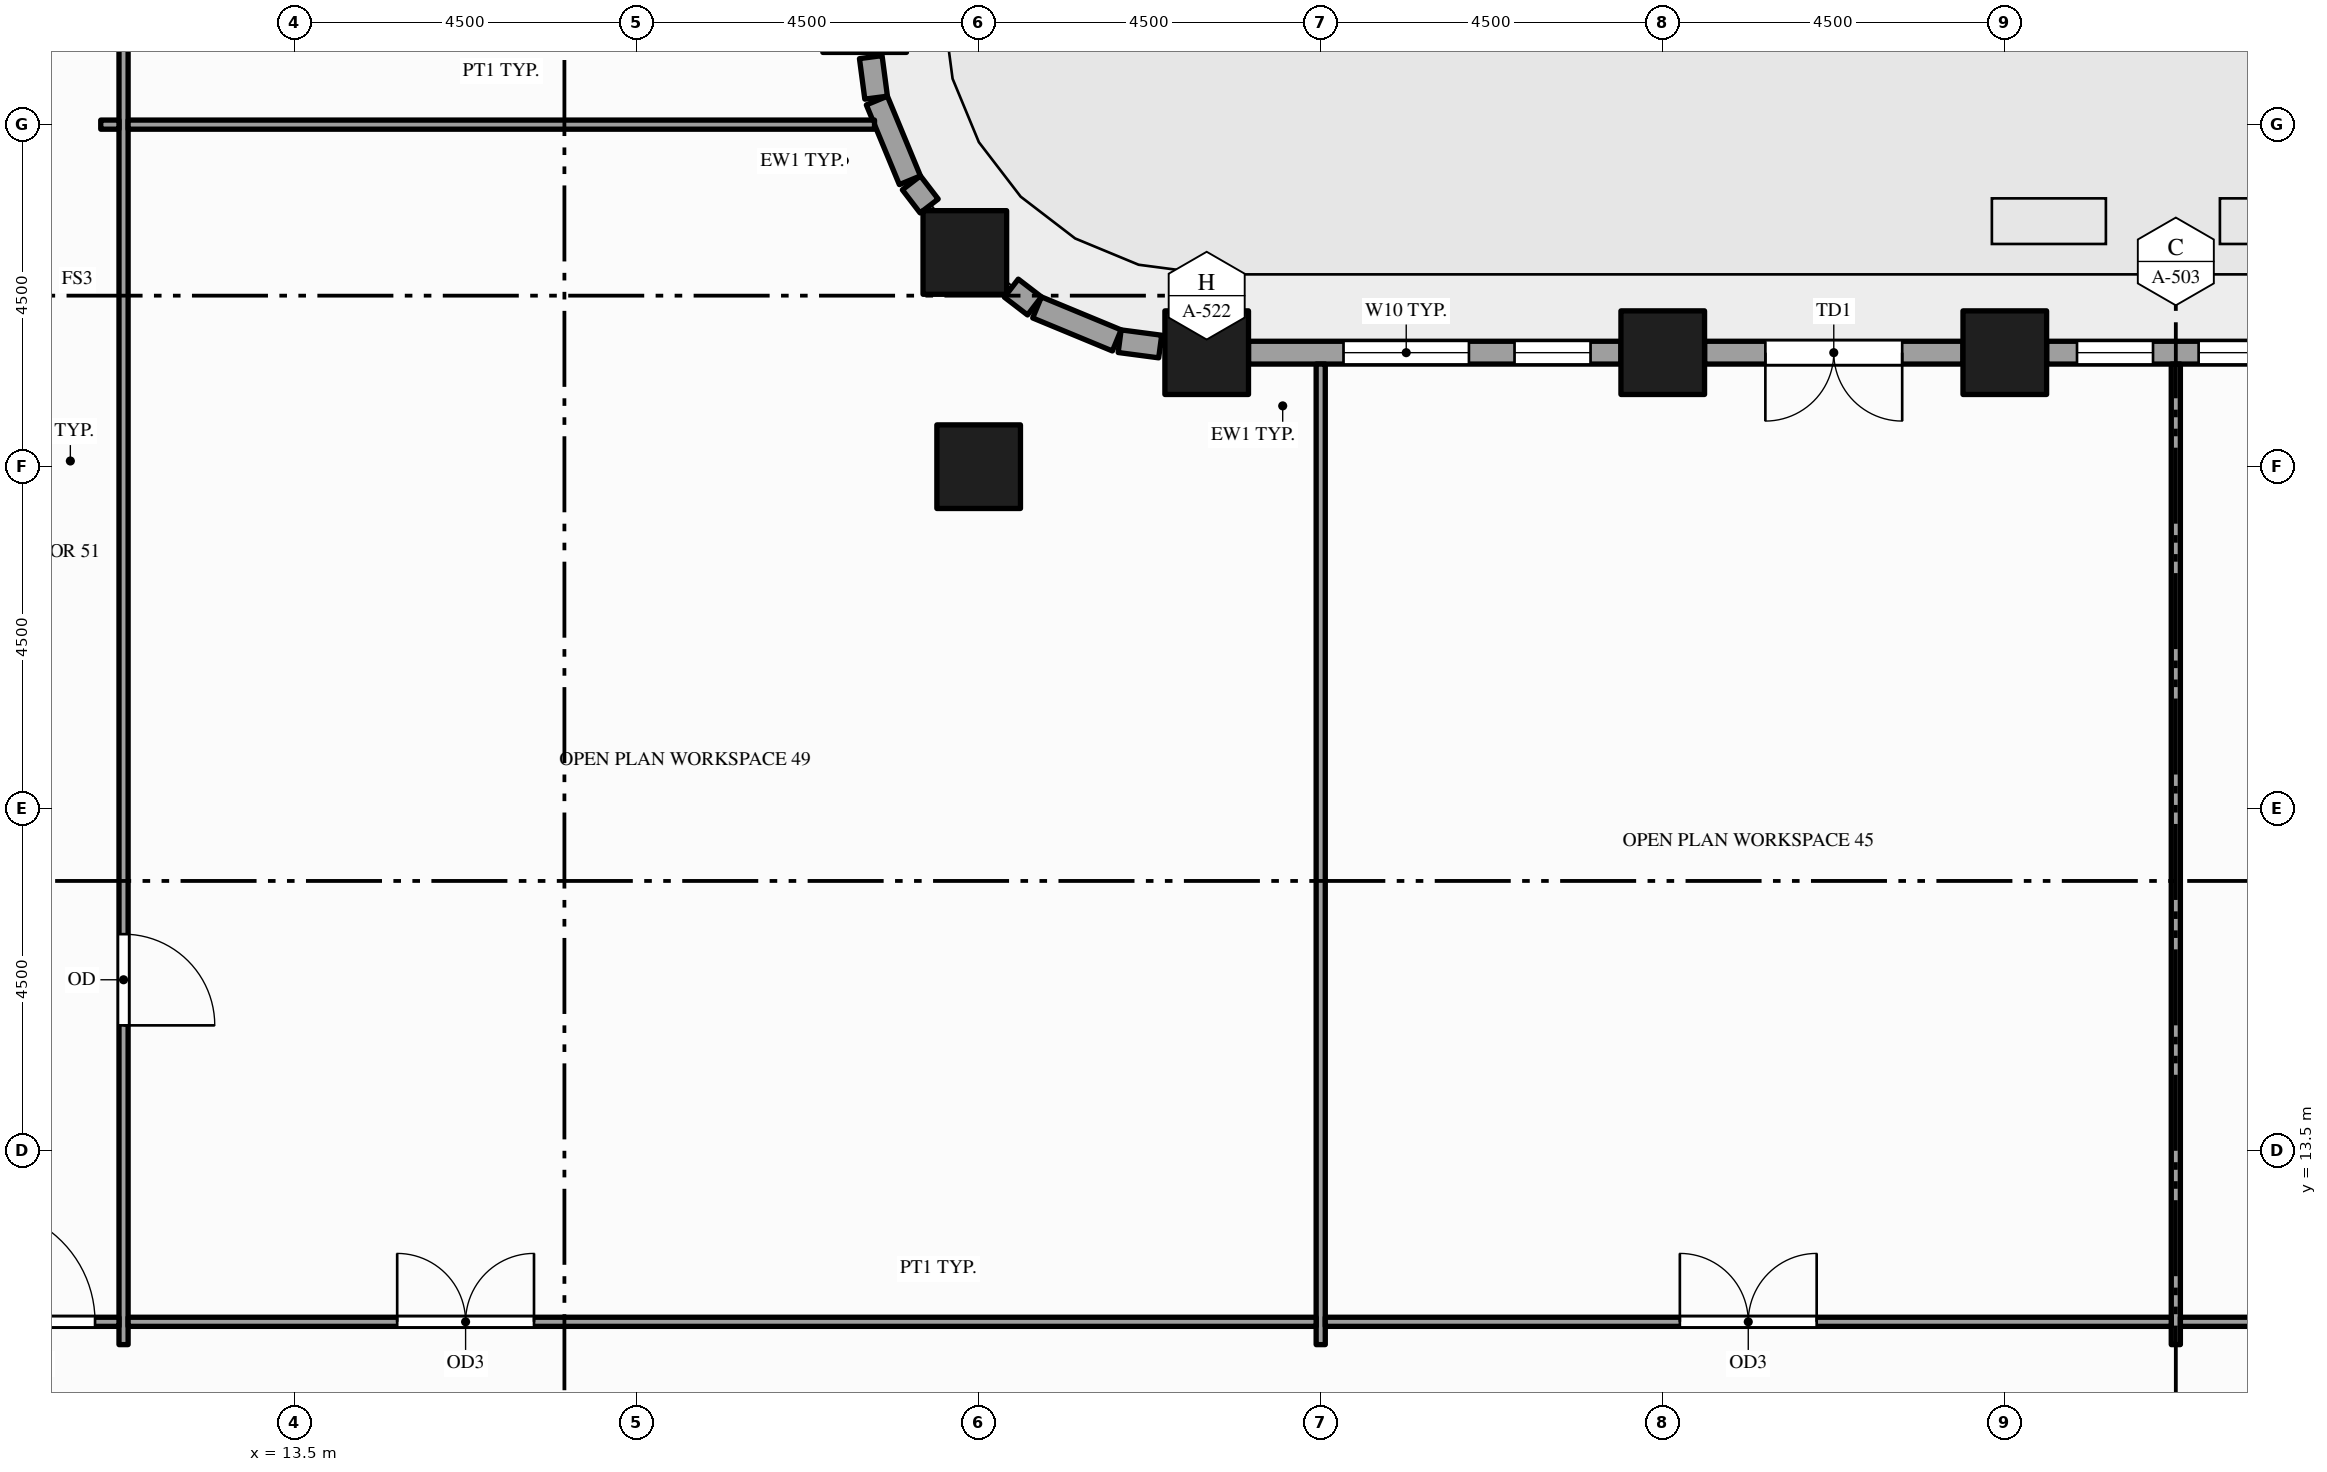
"""IFC4 building model, lengths in metres.
Left out: names, types, materials, properties, quantities, classifications, styles, units other than length and angle.
Written with IfcOpenShell. Run it as: python <this file> out.ifc"""

import sys

from ifc_helpers import new_model, si_unit, direction, frame, frame_2d, origin, origin_2d, place, context, subcontext, project, spatial, rectangle, hollow_rectangle, extrude, element, fill, save


model = new_model("IFC4")
c1 = context("Model", 3, precision=1e-05, world=origin(), true_north=direction((0.0, 1.0)))
c2 = subcontext(c1, "Body", "Model", "MODEL_VIEW")
j1 = project(units=[si_unit("LENGTHUNIT", "METRE"), si_unit("PLANEANGLEUNIT", "RADIAN")], contexts=[c1])
p1 = place(None, origin())
s1 = spatial("IfcSite", under=j1, at=p1, CompositionType="ELEMENT")
p2 = place(p1, origin())
s2 = spatial("IfcBuilding", under=s1, at=p2, CompositionType="ELEMENT")
p3 = place(p2, frame((0.0, 0.0, 29.0)))
s3 = spatial("IfcBuildingStorey", under=s2, at=p3, CompositionType="ELEMENT", Elevation=29.0)
p4 = place(p3, frame((22.318, 25.318, -0.3), z_axis=(0.0, 0.0, 1.0), x_axis=(1.0, 0.0, 0.0)))
e1 = element("IfcColumn", 1, at=p4, inside=s3, PredefinedType="COLUMN", context=c2, shape_type="SweptSolid", body=[
    extrude(hollow_rectangle(XDim=1.1, YDim=1.1, WallThickness=0.06, at=origin_2d()), origin(), (0.0, 0.0, 1.0), 4.15),
])
p5 = place(p3, frame((22.5, 22.5, -0.15), z_axis=(0.0, 0.0, 1.0), x_axis=(1.0, 0.0, 0.0)))
e2 = element("IfcColumn", 2, at=p5, inside=s3, PredefinedType="COLUMN", context=c2, shape_type="SweptSolid", body=[
    extrude(hollow_rectangle(XDim=1.1, YDim=1.1, WallThickness=0.06, at=origin_2d()), origin(), (0.0, 0.0, 1.0), 4.0),
])
for number, where, z_axis, x_axis in (
    (3, (25.5, 24.0, -0.3), (0.0, 0.0, 1.0), (1.0, 0.0, 0.0)),
    (4, (31.5, 24.0, -0.3), (0.0, 0.0, 1.0), (1.0, 0.0, 0.0)),
    (5, (36.0, 24.0, -0.3), (0.0, 0.0, 1.0), (1.0, 0.0, 0.0)),
):
    element("IfcColumn", number, at=place(p3, frame(where, z_axis=z_axis, x_axis=x_axis)), inside=s3, PredefinedType="COLUMN", context=c2, shape_type="SweptSolid", body=[
        extrude(hollow_rectangle(XDim=1.1, YDim=1.1, WallThickness=0.06, at=origin_2d()), origin(), (0.0, 0.0, 1.0), 4.15),
    ])
p6 = place(p3, frame((39.95, 24.0, 0.0), z_axis=(0.0, 0.0, 1.0), x_axis=(-1.0, 0.0, 0.0)))
e6 = element("IfcWall", 6, at=p6, inside=s3, PredefinedType="STANDARD", context=c2, shape_type="SweptSolid", body=[
    extrude(rectangle(XDim=3.4, YDim=0.3, at=frame_2d((1.7, 0.0))), origin(), (0.0, 0.0, 1.0), 3.144),
])
p7 = place(p6, frame((0.4, 0.0, 0.9)))
e7 = element("IfcOpeningElement", 7, at=p7, cuts=e6, PredefinedType="OPENING", context=c2, shape_type="SweptSolid", body=[
    extrude(rectangle(XDim=1.0, YDim=2.0, at=frame_2d((0.5, 1.0))), frame((0.0, 0.16, 0.0), z_axis=(0.0, -1.0, 0.0), x_axis=(1.0, 0.0, 0.0)), (0.0, 0.0, 1.0), 0.32),
])
p8 = place(p6, frame((2.0, 0.0, 0.9)))
e8 = element("IfcOpeningElement", 8, at=p8, cuts=e6, PredefinedType="OPENING", context=c2, shape_type="SweptSolid", body=[
    extrude(rectangle(XDim=1.0, YDim=2.0, at=frame_2d((0.5, 1.0))), frame((0.0, 0.16, 0.0), z_axis=(0.0, -1.0, 0.0), x_axis=(1.0, 0.0, 0.0)), (0.0, 0.0, 1.0), 0.32),
])
p9 = place(p3, frame((35.45, 24.0, 0.0), z_axis=(0.0, 0.0, 1.0), x_axis=(-1.0, 0.0, 0.0)))
e9 = element("IfcWall", 9, at=p9, inside=s3, PredefinedType="STANDARD", context=c2, shape_type="SweptSolid", body=[
    extrude(rectangle(XDim=3.4, YDim=0.3, at=frame_2d((1.7, 0.0))), origin(), (0.0, 0.0, 1.0), 3.144),
])
p10 = place(p9, frame((0.8, 0.0, 0.0)))
e10 = element("IfcOpeningElement", 10, at=p10, cuts=e9, PredefinedType="OPENING", context=c2, shape_type="SweptSolid", body=[
    extrude(rectangle(XDim=1.8, YDim=2.4, at=frame_2d((0.9, 1.2))), frame((0.0, 0.16, 0.0), z_axis=(0.0, -1.0, 0.0), x_axis=(1.0, 0.0, 0.0)), (0.0, 0.0, 1.0), 0.32),
])
p11 = place(p3, frame((30.95, 24.0, 0.0), z_axis=(0.0, 0.0, 1.0), x_axis=(-1.0, 0.0, 0.0)))
e11 = element("IfcWall", 11, at=p11, inside=s3, PredefinedType="STANDARD", context=c2, shape_type="SweptSolid", body=[
    extrude(rectangle(XDim=4.9, YDim=0.3, at=frame_2d((2.45, 0.0))), origin(), (0.0, 0.0, 1.0), 3.144),
])
p12 = place(p11, frame((0.4, 0.0, 0.9)))
e12 = element("IfcOpeningElement", 12, at=p12, cuts=e11, PredefinedType="OPENING", context=c2, shape_type="SweptSolid", body=[
    extrude(rectangle(XDim=1.0, YDim=2.0, at=frame_2d((0.5, 1.0))), frame((0.0, 0.16, 0.0), z_axis=(0.0, -1.0, 0.0), x_axis=(1.0, 0.0, 0.0)), (0.0, 0.0, 1.0), 0.32),
])
p13 = place(p11, frame((2.0, 0.0, 0.9)))
e13 = element("IfcOpeningElement", 13, at=p13, cuts=e11, PredefinedType="OPENING", context=c2, shape_type="SweptSolid", body=[
    extrude(rectangle(XDim=1.65, YDim=2.0, at=frame_2d((0.825, 1.0))), frame((0.0, 0.16, 0.0), z_axis=(0.0, -1.0, 0.0), x_axis=(1.0, 0.0, 0.0)), (0.0, 0.0, 1.0), 0.32),
])
p14 = place(p3, frame((24.888, 24.081, 0.0), z_axis=(0.0, 0.0, 1.0), x_axis=(-0.991417173479, 0.130736330569, 0.0)))
e14 = element("IfcWall", 14, at=p14, inside=s3, PredefinedType="STANDARD", context=c2, shape_type="SweptSolid", body=[
    extrude(rectangle(XDim=0.538, YDim=0.3, at=frame_2d((0.269, 0.0))), origin(), (0.0, 0.0, 1.0), 2.938),
])
p15 = place(p3, frame((24.317, 24.161, 0.0), z_axis=(0.0, 0.0, 1.0), x_axis=(-0.923914616768, 0.382598720491, 0.0)))
e15 = element("IfcWall", 15, at=p15, inside=s3, PredefinedType="STANDARD", context=c2, shape_type="SweptSolid", body=[
    extrude(rectangle(XDim=1.135, YDim=0.3, at=frame_2d((0.568, 0.0))), origin(), (0.0, 0.0, 1.0), 3.144),
])
for number, where, z_axis, x_axis in (
    (16, (23.234, 24.615, 0.0), (0.0, 0.0, 1.0), (-0.794, 0.609, 0.0)),
    (17, (21.849, 25.93, 0.0), (0.0, 0.0, 1.0), (-0.609, 0.794, 0.0)),
):
    element("IfcWall", number, at=place(p3, frame(where, z_axis=z_axis, x_axis=x_axis)), inside=s3, PredefinedType="STANDARD", context=c2, shape_type="SweptSolid", body=[
        extrude(rectangle(XDim=0.384, YDim=0.3, at=frame_2d((0.192, 0.0))), origin(), (0.0, 0.0, 1.0), 3.144),
    ])
p16 = place(p3, frame((21.595, 26.268, 0.0), z_axis=(0.0, 0.0, 1.0), x_axis=(-0.382598720491, 0.923914616768, 0.0)))
e18 = element("IfcWall", 18, at=p16, inside=s3, PredefinedType="STANDARD", context=c2, shape_type="SweptSolid", body=[
    extrude(rectangle(XDim=1.135, YDim=0.3, at=frame_2d((0.568, 0.0))), origin(), (0.0, 0.0, 1.0), 3.144),
])
p17 = place(p3, frame((21.151, 27.355, 0.0), z_axis=(0.0, 0.0, 1.0), x_axis=(-0.130736330569, 0.991417173479, 0.0)))
e19 = element("IfcWall", 19, at=p17, inside=s3, PredefinedType="STANDARD", context=c2, shape_type="SweptSolid", body=[
    extrude(rectangle(XDim=0.538, YDim=0.3, at=frame_2d((0.269, 0.0))), origin(), (0.0, 0.0, 1.0), 3.144),
])
p18 = place(p3, frame((11.25, 10.95, 0.0), z_axis=(0.0, 0.0, 1.0), x_axis=(0.0, 1.0, 0.0)))
e20 = element("IfcWall", 20, at=p18, inside=s3, PredefinedType="PARTITIONING", context=c2, shape_type="SweptSolid", body=[
    extrude(rectangle(XDim=20.85, YDim=0.12, at=frame_2d((10.425, 0.0))), origin(), (0.0, 0.0, 1.0), 2.6),
])
p19 = place(p18, frame((17.85, 0.0, 0.0)))
e21 = element("IfcOpeningElement", 21, at=p19, cuts=e20, PredefinedType="OPENING", context=c2, shape_type="SweptSolid", body=[
    extrude(rectangle(XDim=0.9, YDim=2.1, at=frame_2d((0.45, 1.05))), frame((0.0, 0.07, 0.0), z_axis=(0.0, -1.0, 0.0), x_axis=(1.0, 0.0, 0.0)), (0.0, 0.0, 1.0), 0.14),
])
p20 = place(p18, frame((4.2, 0.0, 0.0)))
e22 = element("IfcOpeningElement", 22, at=p20, cuts=e20, PredefinedType="OPENING", context=c2, shape_type="SweptSolid", body=[
    extrude(rectangle(XDim=1.2, YDim=2.1, at=frame_2d((0.6, 1.05))), frame((0.0, 0.07, 0.0), z_axis=(0.0, -1.0, 0.0), x_axis=(1.0, 0.0, 0.0)), (0.0, 0.0, 1.0), 0.14),
])
for number, where, z_axis, x_axis in (
    (23, (27.0, 10.95, 0.0), (0.0, 0.0, 1.0), (0.0, 1.0, 0.0)),
    (24, (38.25, 10.95, 0.0), (0.0, 0.0, 1.0), (0.0, 1.0, 0.0)),
):
    element("IfcWall", number, at=place(p3, frame(where, z_axis=z_axis, x_axis=x_axis)), inside=s3, PredefinedType="PARTITIONING", context=c2, shape_type="SweptSolid", body=[
        extrude(rectangle(XDim=12.9, YDim=0.12, at=frame_2d((6.45, 0.0))), origin(), (0.0, 0.0, 1.0), 2.938),
    ])
p21 = place(p3, frame((9.06, 11.25, 0.0), z_axis=(0.0, 0.0, 1.0), x_axis=(1.0, 0.0, 0.0)))
e25 = element("IfcWall", 25, at=p21, inside=s3, PredefinedType="PARTITIONING", context=c2, shape_type="SweptSolid", body=[
    extrude(rectangle(XDim=2.13, YDim=0.12, at=frame_2d((1.065, 0.0))), origin(), (0.0, 0.0, 1.0), 2.938),
])
p22 = place(p21, frame((0.315, 0.0, 0.0)))
e26 = element("IfcOpeningElement", 26, at=p22, cuts=e25, PredefinedType="OPENING", context=c2, shape_type="SweptSolid", body=[
    extrude(rectangle(XDim=1.5, YDim=2.1, at=frame_2d((0.75, 1.05))), frame((0.0, 0.07, 0.0), z_axis=(0.0, -1.0, 0.0), x_axis=(1.0, 0.0, 0.0)), (0.0, 0.0, 1.0), 0.14),
])
p23 = place(p3, frame((11.31, 11.25, 0.0), z_axis=(0.0, 0.0, 1.0), x_axis=(1.0, 0.0, 0.0)))
e27 = element("IfcWall", 27, at=p23, inside=s3, PredefinedType="PARTITIONING", context=c2, shape_type="SweptSolid", body=[
    extrude(rectangle(XDim=15.63, YDim=0.12, at=frame_2d((7.815, 0.0))), origin(), (0.0, 0.0, 1.0), 2.938),
])
p24 = place(p23, frame((3.54, 0.0, 0.0)))
e28 = element("IfcOpeningElement", 28, at=p24, cuts=e27, PredefinedType="OPENING", context=c2, shape_type="SweptSolid", body=[
    extrude(rectangle(XDim=1.8, YDim=2.1, at=frame_2d((0.9, 1.05))), frame((0.0, 0.07, 0.0), z_axis=(0.0, -1.0, 0.0), x_axis=(1.0, 0.0, 0.0)), (0.0, 0.0, 1.0), 0.14),
])
p25 = place(p3, frame((27.06, 11.25, 0.0), z_axis=(0.0, 0.0, 1.0), x_axis=(1.0, 0.0, 0.0)))
e29 = element("IfcWall", 29, at=p25, inside=s3, PredefinedType="PARTITIONING", context=c2, shape_type="SweptSolid", body=[
    extrude(rectangle(XDim=11.13, YDim=0.12, at=frame_2d((5.565, 0.0))), origin(), (0.0, 0.0, 1.0), 2.938),
])
p26 = place(p25, frame((4.665, 0.0, 0.0)))
e30 = element("IfcOpeningElement", 30, at=p26, cuts=e29, PredefinedType="OPENING", context=c2, shape_type="SweptSolid", body=[
    extrude(rectangle(XDim=1.8, YDim=2.1, at=frame_2d((0.9, 1.05))), frame((0.0, 0.07, 0.0), z_axis=(0.0, -1.0, 0.0), x_axis=(1.0, 0.0, 0.0)), (0.0, 0.0, 1.0), 0.14),
])
p27 = place(p3, frame((38.31, 11.25, 0.0), z_axis=(0.0, 0.0, 1.0), x_axis=(1.0, 0.0, 0.0)))
e31 = element("IfcWall", 31, at=p27, inside=s3, PredefinedType="PARTITIONING", context=c2, shape_type="SweptSolid", body=[
    extrude(rectangle(XDim=6.63, YDim=0.12, at=frame_2d((3.315, 0.0))), origin(), (0.0, 0.0, 1.0), 2.938),
])
p28 = place(p27, frame((2.815, 0.0, 0.0)))
e32 = element("IfcOpeningElement", 32, at=p28, cuts=e31, PredefinedType="OPENING", context=c2, shape_type="SweptSolid", body=[
    extrude(rectangle(XDim=1.0, YDim=2.1, at=frame_2d((0.5, 1.05))), frame((0.0, 0.07, 0.0), z_axis=(0.0, -1.0, 0.0), x_axis=(1.0, 0.0, 0.0)), (0.0, 0.0, 1.0), 0.14),
])
p29 = place(p3, frame((10.95, 27.0, 0.0), z_axis=(0.0, 0.0, 1.0), x_axis=(1.0, 0.0, 0.0)))
e33 = element("IfcWall", 33, at=p29, inside=s3, PredefinedType="PARTITIONING", context=c2, shape_type="SweptSolid", body=[
    extrude(rectangle(XDim=0.24, YDim=0.12, at=frame_2d((0.12, 0.0))), origin(), (0.0, 0.0, 1.0), 2.938),
])
p30 = place(p3, frame((11.31, 27.0, 0.0), z_axis=(0.0, 0.0, 1.0), x_axis=(1.0, 0.0, 0.0)))
e34 = element("IfcWall", 34, at=p30, inside=s3, PredefinedType="PARTITIONING", context=c2, shape_type="SweptSolid", body=[
    extrude(rectangle(XDim=9.82, YDim=0.12, at=frame_2d((4.91, 0.0))), origin(), (0.0, 0.0, 1.0), 2.938),
])
p31 = place(p7, origin())
e35 = element("IfcWindow", 35, at=p31, inside=s3, PartitioningType="SINGLE_PANEL", PredefinedType="WINDOW", context=c2, shape_type="SweptSolid", body=[
    extrude(rectangle(XDim=1.0, YDim=2.0, at=frame_2d((0.5, 1.0))), frame((0.0, 0.03, 0.0), z_axis=(0.0, -1.0, 0.0), x_axis=(1.0, 0.0, 0.0)), (0.0, 0.0, 1.0), 0.06),
])
fill(e7, e35)
p32 = place(p8, origin())
e36 = element("IfcWindow", 36, at=p32, inside=s3, PartitioningType="SINGLE_PANEL", PredefinedType="WINDOW", context=c2, shape_type="SweptSolid", body=[
    extrude(rectangle(XDim=1.0, YDim=2.0, at=frame_2d((0.5, 1.0))), frame((0.0, 0.03, 0.0), z_axis=(0.0, -1.0, 0.0), x_axis=(1.0, 0.0, 0.0)), (0.0, 0.0, 1.0), 0.06),
])
fill(e8, e36)
p33 = place(p10, origin())
e37 = element("IfcDoor", 37, at=p33, inside=s3, OperationType="DOUBLE_DOOR_SINGLE_SWING", PredefinedType="DOOR", context=c2, shape_type="SweptSolid", body=[
    extrude(rectangle(XDim=1.8, YDim=2.4, at=frame_2d((0.9, 1.2))), frame((0.0, 0.025, 0.0), z_axis=(0.0, -1.0, 0.0), x_axis=(1.0, 0.0, 0.0)), (0.0, 0.0, 1.0), 0.05),
])
fill(e10, e37)
p34 = place(p12, origin())
e38 = element("IfcWindow", 38, at=p34, inside=s3, PartitioningType="SINGLE_PANEL", PredefinedType="WINDOW", context=c2, shape_type="SweptSolid", body=[
    extrude(rectangle(XDim=1.0, YDim=2.0, at=frame_2d((0.5, 1.0))), frame((0.0, 0.03, 0.0), z_axis=(0.0, -1.0, 0.0), x_axis=(1.0, 0.0, 0.0)), (0.0, 0.0, 1.0), 0.06),
])
fill(e12, e38)
p35 = place(p13, origin())
e39 = element("IfcWindow", 39, at=p35, inside=s3, PartitioningType="SINGLE_PANEL", PredefinedType="WINDOW", context=c2, shape_type="SweptSolid", body=[
    extrude(rectangle(XDim=1.65, YDim=2.0, at=frame_2d((0.825, 1.0))), frame((0.0, 0.03, 0.0), z_axis=(0.0, -1.0, 0.0), x_axis=(1.0, 0.0, 0.0)), (0.0, 0.0, 1.0), 0.06),
])
fill(e13, e39)
p36 = place(p26, origin())
e40 = element("IfcDoor", 40, at=p36, inside=s3, OperationType="DOUBLE_DOOR_SINGLE_SWING", PredefinedType="DOOR", context=c2, shape_type="SweptSolid", body=[
    extrude(rectangle(XDim=1.8, YDim=2.1, at=frame_2d((0.9, 1.05))), frame((0.0, 0.025, 0.0), z_axis=(0.0, -1.0, 0.0), x_axis=(1.0, 0.0, 0.0)), (0.0, 0.0, 1.0), 0.05),
])
fill(e30, e40)
p37 = place(p24, origin())
e41 = element("IfcDoor", 41, at=p37, inside=s3, OperationType="DOUBLE_DOOR_SINGLE_SWING", PredefinedType="DOOR", context=c2, shape_type="SweptSolid", body=[
    extrude(rectangle(XDim=1.8, YDim=2.1, at=frame_2d((0.9, 1.05))), frame((0.0, 0.025, 0.0), z_axis=(0.0, -1.0, 0.0), x_axis=(1.0, 0.0, 0.0)), (0.0, 0.0, 1.0), 0.05),
])
fill(e28, e41)
p38 = place(p22, origin())
e42 = element("IfcDoor", 42, at=p38, inside=s3, OperationType="SINGLE_SWING_LEFT", PredefinedType="DOOR", context=c2, shape_type="SweptSolid", body=[
    extrude(rectangle(XDim=1.5, YDim=2.1, at=frame_2d((0.75, 1.05))), frame((0.0, 0.025, 0.0), z_axis=(0.0, -1.0, 0.0), x_axis=(1.0, 0.0, 0.0)), (0.0, 0.0, 1.0), 0.05),
])
fill(e26, e42)
p39 = place(p20, origin())
e43 = element("IfcDoor", 43, at=p39, inside=s3, OperationType="SINGLE_SWING_LEFT", PredefinedType="DOOR", context=c2, shape_type="SweptSolid", body=[
    extrude(rectangle(XDim=1.2, YDim=2.1, at=frame_2d((0.6, 1.05))), frame((0.0, 0.025, 0.0), z_axis=(0.0, -1.0, 0.0), x_axis=(1.0, 0.0, 0.0)), (0.0, 0.0, 1.0), 0.05),
])
fill(e22, e43)
save(model, sys.argv[1])
